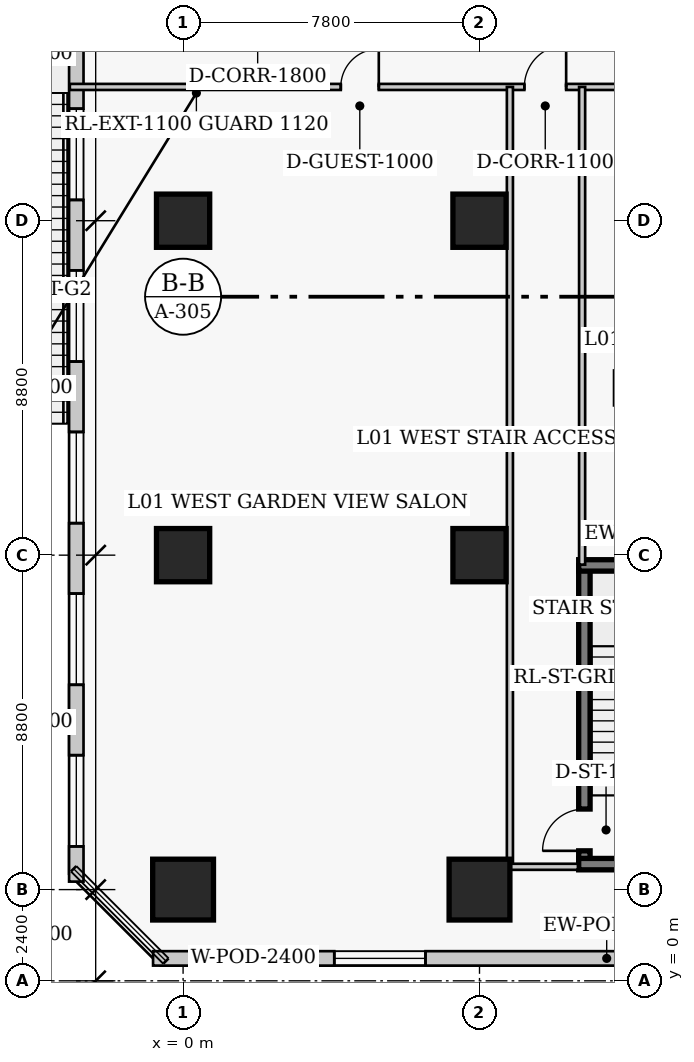
"""IFC4 building model, lengths in metres.
Left out: names, types, materials, properties, quantities, classifications, styles, units other than length and angle.
Written with IfcOpenShell. Run it as: python <this file> out.ifc"""

import sys

from ifc_helpers import new_model, si_unit, direction, frame, frame_2d, origin, origin_2d, place, context, subcontext, project, spatial, rectangle, extrude, element, fill, save


model = new_model("IFC4")
c1 = context("Model", 3, precision=1e-05, world=origin(), true_north=direction((0.0, 1.0)))
c2 = subcontext(c1, "Body", "Model", "MODEL_VIEW")
j1 = project(units=[si_unit("LENGTHUNIT", "METRE"), si_unit("PLANEANGLEUNIT", "RADIAN")], contexts=[c1])
p1 = place(None, origin())
s1 = spatial("IfcSite", under=j1, at=p1, CompositionType="ELEMENT")
p2 = place(p1, origin())
s2 = spatial("IfcBuilding", under=s1, at=p2, CompositionType="ELEMENT")
p3 = place(p2, frame((0.0, 0.0, 5.4)))
s3 = spatial("IfcBuildingStorey", under=s2, at=p3, CompositionType="ELEMENT", Elevation=5.4)
p4 = place(p3, frame((10.56, 3.07, 0.0), z_axis=(0.0, 0.0, 1.0), x_axis=(0.0, 1.0, 0.0)))
e1 = element("IfcWall", 1, at=p4, inside=s3, PredefinedType="SHEAR", context=c2, shape_type="SweptSolid", body=[
    extrude(rectangle(XDim=7.86, YDim=0.3, at=frame_2d((3.93, 0.0))), origin(), (0.0, 0.0, 1.0), 5.0),
])
p5 = place(p4, frame((0.35, 0.0, 0.0)))
e2 = element("IfcOpeningElement", 2, at=p5, cuts=e1, PredefinedType="OPENING", context=c2, shape_type="SweptSolid", body=[
    extrude(rectangle(XDim=1.1, YDim=2.15, at=frame_2d((0.55, 1.075))), frame((0.0, 0.16, 0.0), z_axis=(0.0, -1.0, 0.0), x_axis=(1.0, 0.0, 0.0)), (0.0, 0.0, 1.0), 0.32),
])
for number, where, z_axis, x_axis in (
    (3, (10.41, 10.93, 0.0), (0.0, 0.0, 1.0), (1.0, 0.0, 0.0)),
    (4, (10.41, 3.07, 0.0), (0.0, 0.0, 1.0), (1.0, 0.0, 0.0)),
):
    element("IfcWall", number, at=place(p3, frame(where, z_axis=z_axis, x_axis=x_axis)), inside=s3, PredefinedType="SHEAR", context=c2, shape_type="SweptSolid", body=[
        extrude(rectangle(XDim=4.07, YDim=0.3, at=frame_2d((2.035, 0.0))), origin(), (0.0, 0.0, 1.0), 5.0),
    ])
p6 = place(p3, frame((0.0, 2.4, 0.0), z_axis=(0.0, 0.0, 1.0), x_axis=(1.0, 0.0, 0.0)))
e5 = element("IfcColumn", 5, at=p6, inside=s3, PredefinedType="COLUMN", context=c2, shape_type="SweptSolid", body=[
    extrude(rectangle(XDim=1.6, YDim=1.6, at=origin_2d()), origin(), (0.0, 0.0, 1.0), 5.0),
])
for number, where, z_axis, x_axis in (
    (6, (0.0, 11.2, 0.0), (0.0, 0.0, 1.0), (1.0, 0.0, 0.0)),
    (7, (0.0, 20.0, 0.0), (0.0, 0.0, 1.0), (1.0, 0.0, 0.0)),
):
    element("IfcColumn", number, at=place(p3, frame(where, z_axis=z_axis, x_axis=x_axis)), inside=s3, PredefinedType="COLUMN", context=c2, shape_type="SweptSolid", body=[
        extrude(rectangle(XDim=1.4, YDim=1.4, at=origin_2d()), origin(), (0.0, 0.0, 1.0), 5.0),
    ])
p7 = place(p3, frame((7.8, 2.4, 0.0), z_axis=(0.0, 0.0, 1.0), x_axis=(1.0, 0.0, 0.0)))
e8 = element("IfcColumn", 8, at=p7, inside=s3, PredefinedType="COLUMN", context=c2, shape_type="SweptSolid", body=[
    extrude(rectangle(XDim=1.6, YDim=1.6, at=origin_2d()), origin(), (0.0, 0.0, 1.0), 5.0),
])
for number, where, z_axis, x_axis in (
    (9, (7.8, 11.2, 0.0), (0.0, 0.0, 1.0), (1.0, 0.0, 0.0)),
    (10, (7.8, 20.0, 0.0), (0.0, 0.0, 1.0), (1.0, 0.0, 0.0)),
):
    element("IfcColumn", number, at=place(p3, frame(where, z_axis=z_axis, x_axis=x_axis)), inside=s3, PredefinedType="COLUMN", context=c2, shape_type="SweptSolid", body=[
        extrude(rectangle(XDim=1.4, YDim=1.4, at=origin_2d()), origin(), (0.0, 0.0, 1.0), 5.0),
    ])
p8 = place(p3, frame((-0.79, 0.59, 0.0), z_axis=(0.0, 0.0, 1.0), x_axis=(1.0, 0.0, 0.0)))
e11 = element("IfcWall", 11, at=p8, inside=s3, PredefinedType="SOLIDWALL", context=c2, shape_type="SweptSolid", body=[
    extrude(rectangle(XDim=79.58, YDim=0.38, at=frame_2d((39.79, 0.0))), origin(), (0.0, 0.0, 1.0), 4.65),
])
p9 = place(p8, frame((1.439, 0.0, 0.75)))
e12 = element("IfcOpeningElement", 12, at=p9, cuts=e11, PredefinedType="OPENING", context=c2, shape_type="SweptSolid", body=[
    extrude(rectangle(XDim=2.4, YDim=2.2, at=frame_2d((1.2, 1.1))), frame((0.0, 0.2, 0.0), z_axis=(0.0, -1.0, 0.0), x_axis=(1.0, 0.0, 0.0)), (0.0, 0.0, 1.0), 0.4),
])
p10 = place(p8, frame((4.769, 0.0, 0.75)))
e13 = element("IfcOpeningElement", 13, at=p10, cuts=e11, PredefinedType="OPENING", context=c2, shape_type="SweptSolid", body=[
    extrude(rectangle(XDim=2.4, YDim=2.2, at=frame_2d((1.2, 1.1))), frame((0.0, 0.2, 0.0), z_axis=(0.0, -1.0, 0.0), x_axis=(1.0, 0.0, 0.0)), (0.0, 0.0, 1.0), 0.4),
])
p11 = place(p8, frame((16.706, 0.0, 0.75)))
e14 = element("IfcOpeningElement", 14, at=p11, cuts=e11, PredefinedType="OPENING", context=c2, shape_type="SweptSolid", body=[
    extrude(rectangle(XDim=2.4, YDim=2.2, at=frame_2d((1.2, 1.1))), frame((0.0, 0.2, 0.0), z_axis=(0.0, -1.0, 0.0), x_axis=(1.0, 0.0, 0.0)), (0.0, 0.0, 1.0), 0.4),
])
p12 = place(p8, frame((20.685, 0.0, 0.75)))
e15 = element("IfcOpeningElement", 15, at=p12, cuts=e11, PredefinedType="OPENING", context=c2, shape_type="SweptSolid", body=[
    extrude(rectangle(XDim=2.4, YDim=2.2, at=frame_2d((1.2, 1.1))), frame((0.0, 0.2, 0.0), z_axis=(0.0, -1.0, 0.0), x_axis=(1.0, 0.0, 0.0)), (0.0, 0.0, 1.0), 0.4),
])
p13 = place(p8, frame((24.664, 0.0, 0.75)))
e16 = element("IfcOpeningElement", 16, at=p13, cuts=e11, PredefinedType="OPENING", context=c2, shape_type="SweptSolid", body=[
    extrude(rectangle(XDim=2.4, YDim=2.2, at=frame_2d((1.2, 1.1))), frame((0.0, 0.2, 0.0), z_axis=(0.0, -1.0, 0.0), x_axis=(1.0, 0.0, 0.0)), (0.0, 0.0, 1.0), 0.4),
])
p14 = place(p8, frame((28.643, 0.0, 0.75)))
e17 = element("IfcOpeningElement", 17, at=p14, cuts=e11, PredefinedType="OPENING", context=c2, shape_type="SweptSolid", body=[
    extrude(rectangle(XDim=2.4, YDim=2.2, at=frame_2d((1.2, 1.1))), frame((0.0, 0.2, 0.0), z_axis=(0.0, -1.0, 0.0), x_axis=(1.0, 0.0, 0.0)), (0.0, 0.0, 1.0), 0.4),
])
p15 = place(p8, frame((31.971, 0.0, 0.75)))
e18 = element("IfcOpeningElement", 18, at=p15, cuts=e11, PredefinedType="OPENING", context=c2, shape_type="SweptSolid", body=[
    extrude(rectangle(XDim=2.4, YDim=2.2, at=frame_2d((1.2, 1.1))), frame((0.0, 0.2, 0.0), z_axis=(0.0, -1.0, 0.0), x_axis=(1.0, 0.0, 0.0)), (0.0, 0.0, 1.0), 0.4),
])
p16 = place(p8, frame((37.75, 0.0, 0.75)))
e19 = element("IfcOpeningElement", 19, at=p16, cuts=e11, PredefinedType="OPENING", context=c2, shape_type="SweptSolid", body=[
    extrude(rectangle(XDim=2.4, YDim=2.2, at=frame_2d((1.2, 1.1))), frame((0.0, 0.2, 0.0), z_axis=(0.0, -1.0, 0.0), x_axis=(1.0, 0.0, 0.0)), (0.0, 0.0, 1.0), 0.4),
])
p17 = place(p8, frame((44.559, 0.0, 0.75)))
e20 = element("IfcOpeningElement", 20, at=p17, cuts=e11, PredefinedType="OPENING", context=c2, shape_type="SweptSolid", body=[
    extrude(rectangle(XDim=2.4, YDim=2.2, at=frame_2d((1.2, 1.1))), frame((0.0, 0.2, 0.0), z_axis=(0.0, -1.0, 0.0), x_axis=(1.0, 0.0, 0.0)), (0.0, 0.0, 1.0), 0.4),
])
p18 = place(p8, frame((49.188, 0.0, 0.75)))
e21 = element("IfcOpeningElement", 21, at=p18, cuts=e11, PredefinedType="OPENING", context=c2, shape_type="SweptSolid", body=[
    extrude(rectangle(XDim=2.4, YDim=2.2, at=frame_2d((1.2, 1.1))), frame((0.0, 0.2, 0.0), z_axis=(0.0, -1.0, 0.0), x_axis=(1.0, 0.0, 0.0)), (0.0, 0.0, 1.0), 0.4),
])
p19 = place(p8, frame((52.517, 0.0, 0.75)))
e22 = element("IfcOpeningElement", 22, at=p19, cuts=e11, PredefinedType="OPENING", context=c2, shape_type="SweptSolid", body=[
    extrude(rectangle(XDim=2.4, YDim=2.2, at=frame_2d((1.2, 1.1))), frame((0.0, 0.2, 0.0), z_axis=(0.0, -1.0, 0.0), x_axis=(1.0, 0.0, 0.0)), (0.0, 0.0, 1.0), 0.4),
])
p20 = place(p8, frame((56.496, 0.0, 0.75)))
e23 = element("IfcOpeningElement", 23, at=p20, cuts=e11, PredefinedType="OPENING", context=c2, shape_type="SweptSolid", body=[
    extrude(rectangle(XDim=2.4, YDim=2.2, at=frame_2d((1.2, 1.1))), frame((0.0, 0.2, 0.0), z_axis=(0.0, -1.0, 0.0), x_axis=(1.0, 0.0, 0.0)), (0.0, 0.0, 1.0), 0.4),
])
p21 = place(p8, frame((60.475, 0.0, 0.75)))
e24 = element("IfcOpeningElement", 24, at=p21, cuts=e11, PredefinedType="OPENING", context=c2, shape_type="SweptSolid", body=[
    extrude(rectangle(XDim=2.4, YDim=2.2, at=frame_2d((1.2, 1.1))), frame((0.0, 0.2, 0.0), z_axis=(0.0, -1.0, 0.0), x_axis=(1.0, 0.0, 0.0)), (0.0, 0.0, 1.0), 0.4),
])
p22 = place(p8, frame((64.454, 0.0, 0.75)))
e25 = element("IfcOpeningElement", 25, at=p22, cuts=e11, PredefinedType="OPENING", context=c2, shape_type="SweptSolid", body=[
    extrude(rectangle(XDim=2.4, YDim=2.2, at=frame_2d((1.2, 1.1))), frame((0.0, 0.2, 0.0), z_axis=(0.0, -1.0, 0.0), x_axis=(1.0, 0.0, 0.0)), (0.0, 0.0, 1.0), 0.4),
])
p23 = place(p8, frame((68.433, 0.0, 0.75)))
e26 = element("IfcOpeningElement", 26, at=p23, cuts=e11, PredefinedType="OPENING", context=c2, shape_type="SweptSolid", body=[
    extrude(rectangle(XDim=2.4, YDim=2.2, at=frame_2d((1.2, 1.1))), frame((0.0, 0.2, 0.0), z_axis=(0.0, -1.0, 0.0), x_axis=(1.0, 0.0, 0.0)), (0.0, 0.0, 1.0), 0.4),
])
p24 = place(p8, frame((72.412, 0.0, 0.75)))
e27 = element("IfcOpeningElement", 27, at=p24, cuts=e11, PredefinedType="OPENING", context=c2, shape_type="SweptSolid", body=[
    extrude(rectangle(XDim=2.4, YDim=2.2, at=frame_2d((1.2, 1.1))), frame((0.0, 0.2, 0.0), z_axis=(0.0, -1.0, 0.0), x_axis=(1.0, 0.0, 0.0)), (0.0, 0.0, 1.0), 0.4),
])
p25 = place(p8, frame((75.74, 0.0, 0.75)))
e28 = element("IfcOpeningElement", 28, at=p25, cuts=e11, PredefinedType="OPENING", context=c2, shape_type="SweptSolid", body=[
    extrude(rectangle(XDim=2.4, YDim=2.2, at=frame_2d((1.2, 1.1))), frame((0.0, 0.2, 0.0), z_axis=(0.0, -1.0, 0.0), x_axis=(1.0, 0.0, 0.0)), (0.0, 0.0, 1.0), 0.4),
])
p26 = place(p3, frame((-2.81, 49.39, 0.0), z_axis=(0.0, 0.0, 1.0), x_axis=(0.0, -1.0, 0.0)))
e29 = element("IfcWall", 29, at=p26, inside=s3, PredefinedType="SOLIDWALL", context=c2, shape_type="SweptSolid", body=[
    extrude(rectangle(XDim=46.78, YDim=0.38, at=frame_2d((23.39, 0.0))), origin(), (0.0, 0.0, 1.0), 4.65),
])
p27 = place(p26, frame((0.927, 0.0, 0.75)))
e30 = element("IfcOpeningElement", 30, at=p27, cuts=e29, PredefinedType="OPENING", context=c2, shape_type="SweptSolid", body=[
    extrude(rectangle(XDim=2.4, YDim=2.2, at=frame_2d((1.2, 1.1))), frame((0.0, 0.2, 0.0), z_axis=(0.0, -1.0, 0.0), x_axis=(1.0, 0.0, 0.0)), (0.0, 0.0, 1.0), 0.4),
])
p28 = place(p26, frame((5.179, 0.0, 0.75)))
e31 = element("IfcOpeningElement", 31, at=p28, cuts=e29, PredefinedType="OPENING", context=c2, shape_type="SweptSolid", body=[
    extrude(rectangle(XDim=2.4, YDim=2.2, at=frame_2d((1.2, 1.1))), frame((0.0, 0.2, 0.0), z_axis=(0.0, -1.0, 0.0), x_axis=(1.0, 0.0, 0.0)), (0.0, 0.0, 1.0), 0.4),
])
p29 = place(p26, frame((9.432, 0.0, 0.75)))
e32 = element("IfcOpeningElement", 32, at=p29, cuts=e29, PredefinedType="OPENING", context=c2, shape_type="SweptSolid", body=[
    extrude(rectangle(XDim=2.4, YDim=2.2, at=frame_2d((1.2, 1.1))), frame((0.0, 0.2, 0.0), z_axis=(0.0, -1.0, 0.0), x_axis=(1.0, 0.0, 0.0)), (0.0, 0.0, 1.0), 0.4),
])
p30 = place(p26, frame((13.685, 0.0, 0.75)))
e33 = element("IfcOpeningElement", 33, at=p30, cuts=e29, PredefinedType="OPENING", context=c2, shape_type="SweptSolid", body=[
    extrude(rectangle(XDim=2.4, YDim=2.2, at=frame_2d((1.2, 1.1))), frame((0.0, 0.2, 0.0), z_axis=(0.0, -1.0, 0.0), x_axis=(1.0, 0.0, 0.0)), (0.0, 0.0, 1.0), 0.4),
])
p31 = place(p26, frame((17.937, 0.0, 0.75)))
e34 = element("IfcOpeningElement", 34, at=p31, cuts=e29, PredefinedType="OPENING", context=c2, shape_type="SweptSolid", body=[
    extrude(rectangle(XDim=2.4, YDim=2.2, at=frame_2d((1.2, 1.1))), frame((0.0, 0.2, 0.0), z_axis=(0.0, -1.0, 0.0), x_axis=(1.0, 0.0, 0.0)), (0.0, 0.0, 1.0), 0.4),
])
p32 = place(p26, frame((26.443, 0.0, 0.75)))
e35 = element("IfcOpeningElement", 35, at=p32, cuts=e29, PredefinedType="OPENING", context=c2, shape_type="SweptSolid", body=[
    extrude(rectangle(XDim=2.4, YDim=2.2, at=frame_2d((1.2, 1.1))), frame((0.0, 0.2, 0.0), z_axis=(0.0, -1.0, 0.0), x_axis=(1.0, 0.0, 0.0)), (0.0, 0.0, 1.0), 0.4),
])
p33 = place(p26, frame((30.696, 0.0, 0.75)))
e36 = element("IfcOpeningElement", 36, at=p33, cuts=e29, PredefinedType="OPENING", context=c2, shape_type="SweptSolid", body=[
    extrude(rectangle(XDim=2.4, YDim=2.2, at=frame_2d((1.2, 1.1))), frame((0.0, 0.2, 0.0), z_axis=(0.0, -1.0, 0.0), x_axis=(1.0, 0.0, 0.0)), (0.0, 0.0, 1.0), 0.4),
])
p34 = place(p26, frame((34.948, 0.0, 0.75)))
e37 = element("IfcOpeningElement", 37, at=p34, cuts=e29, PredefinedType="OPENING", context=c2, shape_type="SweptSolid", body=[
    extrude(rectangle(XDim=2.4, YDim=2.2, at=frame_2d((1.2, 1.1))), frame((0.0, 0.2, 0.0), z_axis=(0.0, -1.0, 0.0), x_axis=(1.0, 0.0, 0.0)), (0.0, 0.0, 1.0), 0.4),
])
p35 = place(p26, frame((39.201, 0.0, 0.75)))
e38 = element("IfcOpeningElement", 38, at=p35, cuts=e29, PredefinedType="OPENING", context=c2, shape_type="SweptSolid", body=[
    extrude(rectangle(XDim=2.4, YDim=2.2, at=frame_2d((1.2, 1.1))), frame((0.0, 0.2, 0.0), z_axis=(0.0, -1.0, 0.0), x_axis=(1.0, 0.0, 0.0)), (0.0, 0.0, 1.0), 0.4),
])
p36 = place(p26, frame((43.454, 0.0, 0.75)))
e39 = element("IfcOpeningElement", 39, at=p36, cuts=e29, PredefinedType="OPENING", context=c2, shape_type="SweptSolid", body=[
    extrude(rectangle(XDim=2.4, YDim=2.2, at=frame_2d((1.2, 1.1))), frame((0.0, 0.2, 0.0), z_axis=(0.0, -1.0, 0.0), x_axis=(1.0, 0.0, 0.0)), (0.0, 0.0, 1.0), 0.4),
])
p37 = place(p3, frame((-2.98, 23.52, 0.0), z_axis=(0.0, 0.0, 1.0), x_axis=(1.0, 0.0, 0.0)))
e40 = element("IfcWall", 40, at=p37, inside=s3, PredefinedType="PARTITIONING", context=c2, shape_type="SweptSolid", body=[
    extrude(rectangle(XDim=83.96, YDim=0.16, at=frame_2d((41.98, 0.0))), origin(), (0.0, 0.0, 1.0), 4.65),
])
p38 = place(p37, frame((7.13, 0.0, 0.0)))
e41 = element("IfcOpeningElement", 41, at=p38, cuts=e40, PredefinedType="OPENING", context=c2, shape_type="SweptSolid", body=[
    extrude(rectangle(XDim=1.0, YDim=2.15, at=frame_2d((0.5, 1.075))), frame((0.0, 0.09, 0.0), z_axis=(0.0, -1.0, 0.0), x_axis=(1.0, 0.0, 0.0)), (0.0, 0.0, 1.0), 0.18),
])
p39 = place(p37, frame((11.96, 0.0, 0.0)))
e42 = element("IfcOpeningElement", 42, at=p39, cuts=e40, PredefinedType="OPENING", context=c2, shape_type="SweptSolid", body=[
    extrude(rectangle(XDim=1.1, YDim=2.15, at=frame_2d((0.55, 1.075))), frame((0.0, 0.09, 0.0), z_axis=(0.0, -1.0, 0.0), x_axis=(1.0, 0.0, 0.0)), (0.0, 0.0, 1.0), 0.18),
])
p40 = place(p37, frame((15.205, 0.0, 0.0)))
e43 = element("IfcOpeningElement", 43, at=p40, cuts=e40, PredefinedType="OPENING", context=c2, shape_type="SweptSolid", body=[
    extrude(rectangle(XDim=0.95, YDim=2.1, at=frame_2d((0.475, 1.05))), frame((0.0, 0.09, 0.0), z_axis=(0.0, -1.0, 0.0), x_axis=(1.0, 0.0, 0.0)), (0.0, 0.0, 1.0), 0.18),
])
p41 = place(p37, frame((28.63, 0.0, 0.0)))
e44 = element("IfcOpeningElement", 44, at=p41, cuts=e40, PredefinedType="OPENING", context=c2, shape_type="SweptSolid", body=[
    extrude(rectangle(XDim=2.2, YDim=2.4, at=frame_2d((1.1, 1.2))), frame((0.0, 0.09, 0.0), z_axis=(0.0, -1.0, 0.0), x_axis=(1.0, 0.0, 0.0)), (0.0, 0.0, 1.0), 0.18),
])
p42 = place(p37, frame((42.88, 0.0, 0.0)))
e45 = element("IfcOpeningElement", 45, at=p42, cuts=e40, PredefinedType="OPENING", context=c2, shape_type="SweptSolid", body=[
    extrude(rectangle(XDim=2.2, YDim=2.4, at=frame_2d((1.1, 1.2))), frame((0.0, 0.09, 0.0), z_axis=(0.0, -1.0, 0.0), x_axis=(1.0, 0.0, 0.0)), (0.0, 0.0, 1.0), 0.18),
])
p43 = place(p37, frame((57.08, 0.0, 0.0)))
e46 = element("IfcOpeningElement", 46, at=p43, cuts=e40, PredefinedType="OPENING", context=c2, shape_type="SweptSolid", body=[
    extrude(rectangle(XDim=2.2, YDim=2.4, at=frame_2d((1.1, 1.2))), frame((0.0, 0.09, 0.0), z_axis=(0.0, -1.0, 0.0), x_axis=(1.0, 0.0, 0.0)), (0.0, 0.0, 1.0), 0.18),
])
p44 = place(p37, frame((67.34, 0.0, 0.0)))
e47 = element("IfcOpeningElement", 47, at=p44, cuts=e40, PredefinedType="OPENING", context=c2, shape_type="SweptSolid", body=[
    extrude(rectangle(XDim=0.88, YDim=2.05, at=frame_2d((0.44, 1.025))), frame((0.0, 0.09, 0.0), z_axis=(0.0, -1.0, 0.0), x_axis=(1.0, 0.0, 0.0)), (0.0, 0.0, 1.0), 0.18),
])
p45 = place(p37, frame((76.29, 0.0, 0.0)))
e48 = element("IfcOpeningElement", 48, at=p45, cuts=e40, PredefinedType="OPENING", context=c2, shape_type="SweptSolid", body=[
    extrude(rectangle(XDim=0.88, YDim=2.05, at=frame_2d((0.44, 1.025))), frame((0.0, 0.09, 0.0), z_axis=(0.0, -1.0, 0.0), x_axis=(1.0, 0.0, 0.0)), (0.0, 0.0, 1.0), 0.18),
])
p46 = place(p3, frame((8.6, 3.0, 0.0), z_axis=(0.0, 0.0, 1.0), x_axis=(0.0, 1.0, 0.0)))
e49 = element("IfcWall", 49, at=p46, inside=s3, PredefinedType="PARTITIONING", context=c2, shape_type="SweptSolid", body=[
    extrude(rectangle(XDim=20.52, YDim=0.16, at=frame_2d((10.26, 0.0))), origin(), (0.0, 0.0, 1.0), 4.65),
])
p47 = place(p3, frame((10.5, 10.95, 0.0), z_axis=(0.0, 0.0, 1.0), x_axis=(0.0, 1.0, 0.0)))
e50 = element("IfcWall", 50, at=p47, inside=s3, PredefinedType="PARTITIONING", context=c2, shape_type="SweptSolid", body=[
    extrude(rectangle(XDim=12.57, YDim=0.16, at=frame_2d((6.285, 0.0))), origin(), (0.0, 0.0, 1.0), 4.65),
])
p48 = place(p3, frame((8.6, 3.0, 0.0), z_axis=(0.0, 0.0, 1.0), x_axis=(1.0, 0.0, 0.0)))
e51 = element("IfcWall", 51, at=p48, inside=s3, PredefinedType="PARTITIONING", context=c2, shape_type="SweptSolid", body=[
    extrude(rectangle(XDim=1.79, YDim=0.16, at=frame_2d((0.895, 0.0))), origin(), (0.0, 0.0, 1.0), 4.65),
])
p49 = place(p9, origin())
e52 = element("IfcWindow", 52, at=p49, inside=s3, PartitioningType="SINGLE_PANEL", PredefinedType="WINDOW", context=c2, shape_type="SweptSolid", body=[
    extrude(rectangle(XDim=2.4, YDim=2.2, at=frame_2d((1.2, 1.1))), frame((0.0, 0.03, 0.0), z_axis=(0.0, -1.0, 0.0), x_axis=(1.0, 0.0, 0.0)), (0.0, 0.0, 1.0), 0.06),
])
fill(e12, e52)
p50 = place(p10, origin())
e53 = element("IfcWindow", 53, at=p50, inside=s3, PartitioningType="SINGLE_PANEL", PredefinedType="WINDOW", context=c2, shape_type="SweptSolid", body=[
    extrude(rectangle(XDim=2.4, YDim=2.2, at=frame_2d((1.2, 1.1))), frame((0.0, 0.03, 0.0), z_axis=(0.0, -1.0, 0.0), x_axis=(1.0, 0.0, 0.0)), (0.0, 0.0, 1.0), 0.06),
])
fill(e13, e53)
p51 = place(p32, origin())
e54 = element("IfcWindow", 54, at=p51, inside=s3, PartitioningType="SINGLE_PANEL", PredefinedType="WINDOW", context=c2, shape_type="SweptSolid", body=[
    extrude(rectangle(XDim=2.4, YDim=2.2, at=frame_2d((1.2, 1.1))), frame((0.0, 0.03, 0.0), z_axis=(0.0, -1.0, 0.0), x_axis=(1.0, 0.0, 0.0)), (0.0, 0.0, 1.0), 0.06),
])
fill(e35, e54)
p52 = place(p33, origin())
e55 = element("IfcWindow", 55, at=p52, inside=s3, PartitioningType="SINGLE_PANEL", PredefinedType="WINDOW", context=c2, shape_type="SweptSolid", body=[
    extrude(rectangle(XDim=2.4, YDim=2.2, at=frame_2d((1.2, 1.1))), frame((0.0, 0.03, 0.0), z_axis=(0.0, -1.0, 0.0), x_axis=(1.0, 0.0, 0.0)), (0.0, 0.0, 1.0), 0.06),
])
fill(e36, e55)
p53 = place(p34, origin())
e56 = element("IfcWindow", 56, at=p53, inside=s3, PartitioningType="SINGLE_PANEL", PredefinedType="WINDOW", context=c2, shape_type="SweptSolid", body=[
    extrude(rectangle(XDim=2.4, YDim=2.2, at=frame_2d((1.2, 1.1))), frame((0.0, 0.03, 0.0), z_axis=(0.0, -1.0, 0.0), x_axis=(1.0, 0.0, 0.0)), (0.0, 0.0, 1.0), 0.06),
])
fill(e37, e56)
p54 = place(p35, origin())
e57 = element("IfcWindow", 57, at=p54, inside=s3, PartitioningType="SINGLE_PANEL", PredefinedType="WINDOW", context=c2, shape_type="SweptSolid", body=[
    extrude(rectangle(XDim=2.4, YDim=2.2, at=frame_2d((1.2, 1.1))), frame((0.0, 0.03, 0.0), z_axis=(0.0, -1.0, 0.0), x_axis=(1.0, 0.0, 0.0)), (0.0, 0.0, 1.0), 0.06),
])
fill(e38, e57)
p55 = place(p36, origin())
e58 = element("IfcWindow", 58, at=p55, inside=s3, PartitioningType="SINGLE_PANEL", PredefinedType="WINDOW", context=c2, shape_type="SweptSolid", body=[
    extrude(rectangle(XDim=2.4, YDim=2.2, at=frame_2d((1.2, 1.1))), frame((0.0, 0.03, 0.0), z_axis=(0.0, -1.0, 0.0), x_axis=(1.0, 0.0, 0.0)), (0.0, 0.0, 1.0), 0.06),
])
fill(e39, e58)
p56 = place(p38, origin())
e59 = element("IfcDoor", 59, at=p56, inside=s3, OperationType="SINGLE_SWING_RIGHT", PredefinedType="DOOR", context=c2, shape_type="SweptSolid", body=[
    extrude(rectangle(XDim=1.0, YDim=2.15, at=frame_2d((0.5, 1.075))), frame((0.0, 0.025, 0.0), z_axis=(0.0, -1.0, 0.0), x_axis=(1.0, 0.0, 0.0)), (0.0, 0.0, 1.0), 0.05),
])
fill(e41, e59)
p57 = place(p39, origin())
e60 = element("IfcDoor", 60, at=p57, inside=s3, OperationType="SINGLE_SWING_RIGHT", PredefinedType="DOOR", context=c2, shape_type="SweptSolid", body=[
    extrude(rectangle(XDim=1.1, YDim=2.15, at=frame_2d((0.55, 1.075))), frame((0.0, 0.025, 0.0), z_axis=(0.0, -1.0, 0.0), x_axis=(1.0, 0.0, 0.0)), (0.0, 0.0, 1.0), 0.05),
])
fill(e42, e60)
p58 = place(p5, origin())
e61 = element("IfcDoor", 61, at=p58, inside=s3, OperationType="SINGLE_SWING_LEFT", PredefinedType="DOOR", context=c2, shape_type="SweptSolid", body=[
    extrude(rectangle(XDim=1.1, YDim=2.15, at=frame_2d((0.55, 1.075))), frame((0.0, 0.025, 0.0), z_axis=(0.0, -1.0, 0.0), x_axis=(1.0, 0.0, 0.0)), (0.0, 0.0, 1.0), 0.05),
])
fill(e2, e61)
save(model, sys.argv[1])
